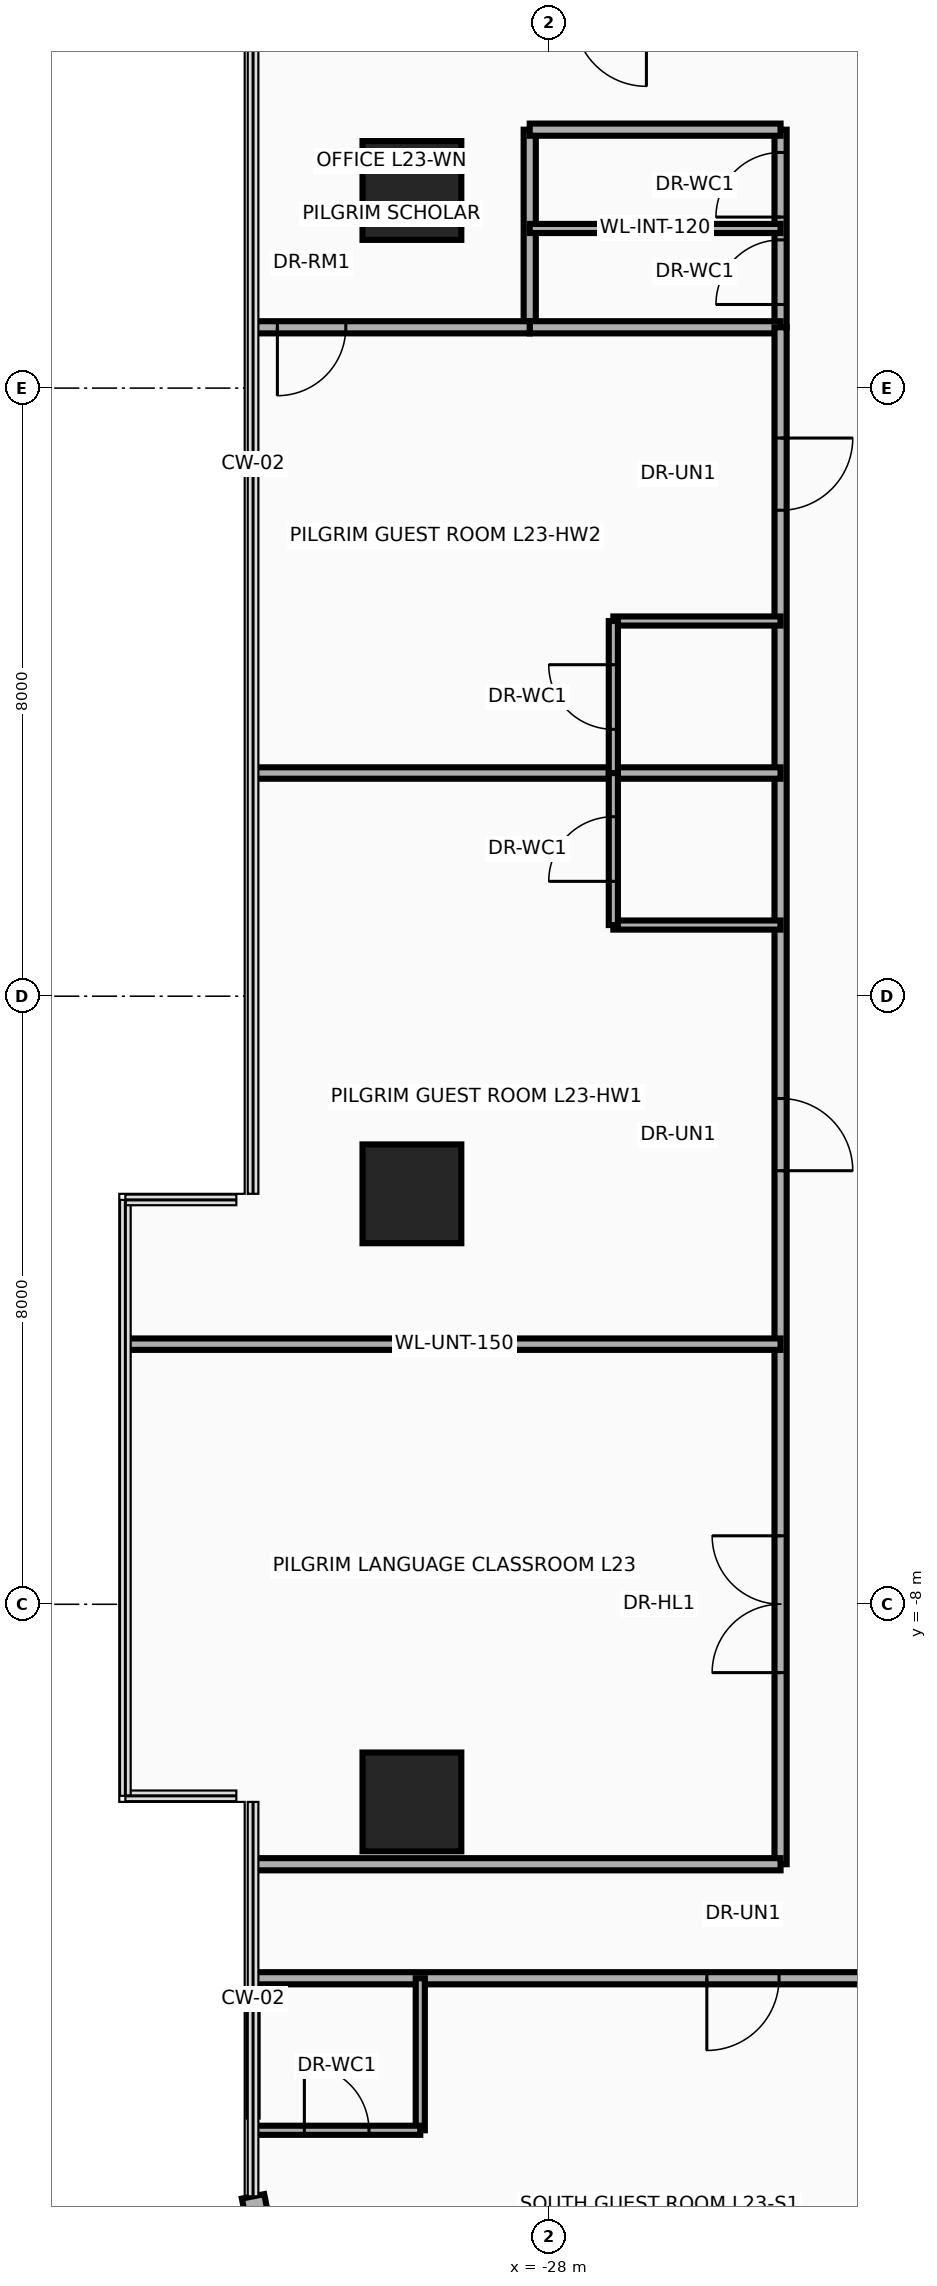
"""IFC4 building model, lengths in metres.
Left out: names, types, materials, properties, quantities, classifications, styles, units other than length and angle.
Written with IfcOpenShell. Run it as: python <this file> out.ifc"""

import sys

from ifc_helpers import new_model, si_unit, direction, frame, frame_2d, origin, origin_2d, place, context, subcontext, project, spatial, rectangle, circle, extrude, source, transform, mapped, element, fill, save


model = new_model("IFC4")
c1 = context("Model", 3, precision=1e-05, world=origin(), true_north=direction((0.0, 1.0)))
c2 = subcontext(c1, "Body", "Model", "MODEL_VIEW")
j1 = project(units=[si_unit("LENGTHUNIT", "METRE"), si_unit("PLANEANGLEUNIT", "RADIAN")], contexts=[c1])
p1 = place(None, origin())
s1 = spatial("IfcSite", under=j1, at=p1, CompositionType="ELEMENT")
p2 = place(p1, origin())
s2 = spatial("IfcBuilding", under=s1, at=p2, CompositionType="ELEMENT")
p3 = place(p2, frame((0.0, 0.0, 92.6)))
s3 = spatial("IfcBuildingStorey", under=s2, at=p3, CompositionType="ELEMENT", Elevation=92.6)
m1 = source(origin(), c2, "Body", "SweptSolid", [
    extrude(circle(Radius=0.65, at=origin_2d()), origin(), (0.0, 0.0, 1.0), 3.7),
])
for number, where, z_axis, x_axis in (
    (1, (-29.8, -10.6, 0.0), (0.0, 0.0, 1.0), (1.0, 0.0, 0.0)),
    (2, (-29.8, -2.6, 0.0), (0.0, 0.0, 1.0), (1.0, 0.0, 0.0)),
    (3, (-29.8, 10.6, 0.0), (0.0, 0.0, 1.0), (1.0, 0.0, 0.0)),
):
    element("IfcColumn", number, at=place(p3, frame(where, z_axis=z_axis, x_axis=x_axis)), inside=s3, PredefinedType="COLUMN", context=c2, shape_type="MappedRepresentation", body=[
        mapped(m1, transform((0.0, 0.0, 0.0), x_axis=(1.0, 0.0, 0.0), y_axis=(0.0, 1.0, 0.0), z_axis=(0.0, 0.0, 1.0), scale=1.0)),
    ])
p4 = place(p3, frame((-31.653, -16.982, 0.0), z_axis=(0.0, 0.0, 1.0), x_axis=(-0.194996050505, 0.980804027463, 0.0)))
e4 = element("IfcWall", 4, at=p4, inside=s3, PredefinedType="SOLIDWALL", context=c2, shape_type="SweptSolid", body=[
    extrude(rectangle(XDim=1.216, YDim=0.3, at=frame_2d((0.608, 0.0))), origin(), (0.0, 0.0, 1.0), 3.46),
])
p5 = place(p3, frame((-28.25, 8.8, 0.0), z_axis=(0.0, 0.0, 1.0), x_axis=(0.0, 1.0, 0.0)))
e5 = element("IfcWall", 5, at=p5, inside=s3, PredefinedType="PARTITIONING", context=c2, shape_type="SweptSolid", body=[
    extrude(rectangle(XDim=2.6, YDim=0.16, at=frame_2d((1.3, 0.0))), origin(), (0.0, 0.0, 1.0), 2.583),
])
p6 = place(p3, frame((-24.95, 8.8, 0.0), z_axis=(0.0, 0.0, 1.0), x_axis=(0.0, 1.0, 0.0)))
e6 = element("IfcWall", 6, at=p6, inside=s3, PredefinedType="PARTITIONING", context=c2, shape_type="SweptSolid", body=[
    extrude(rectangle(XDim=2.6, YDim=0.16, at=frame_2d((1.3, 0.0))), origin(), (0.0, 0.0, 1.0), 2.583),
])
p7 = place(p6, frame((0.3, 0.0, 0.0)))
e7 = element("IfcOpeningElement", 7, at=p7, cuts=e6, PredefinedType="OPENING", context=c2, shape_type="SweptSolid", body=[
    extrude(rectangle(XDim=0.85, YDim=2.1, at=frame_2d((0.425, 1.05))), frame((0.0, 0.095, 0.0), z_axis=(0.0, -1.0, 0.0), x_axis=(1.0, 0.0, 0.0)), (0.0, 0.0, 1.0), 0.19),
])
p8 = place(p6, frame((1.45, 0.0, 0.0)))
e8 = element("IfcOpeningElement", 8, at=p8, cuts=e6, PredefinedType="OPENING", context=c2, shape_type="SweptSolid", body=[
    extrude(rectangle(XDim=0.85, YDim=2.1, at=frame_2d((0.425, 1.05))), frame((0.0, 0.095, 0.0), z_axis=(0.0, -1.0, 0.0), x_axis=(1.0, 0.0, 0.0)), (0.0, 0.0, 1.0), 0.19),
])
for number, where, z_axis, x_axis in (
    (9, (-28.25, 8.8, 0.0), (0.0, 0.0, 1.0), (1.0, 0.0, 0.0)),
    (10, (-28.25, 11.4, 0.0), (0.0, 0.0, 1.0), (1.0, 0.0, 0.0)),
):
    element("IfcWall", number, at=place(p3, frame(where, z_axis=z_axis, x_axis=x_axis)), inside=s3, PredefinedType="PARTITIONING", context=c2, shape_type="SweptSolid", body=[
        extrude(rectangle(XDim=3.3, YDim=0.16, at=frame_2d((1.65, 0.0))), origin(), (0.0, 0.0, 1.0), 3.46),
    ])
p9 = place(p3, frame((-28.25, 10.1, 0.0), z_axis=(0.0, 0.0, 1.0), x_axis=(1.0, 0.0, 0.0)))
e11 = element("IfcWall", 11, at=p9, inside=s3, PredefinedType="PARTITIONING", context=c2, shape_type="SweptSolid", body=[
    extrude(rectangle(XDim=3.3, YDim=0.12, at=frame_2d((1.65, 0.0))), origin(), (0.0, 0.0, 1.0), 3.46),
])
p10 = place(p3, frame((-24.95, -11.42, 0.0), z_axis=(0.0, 0.0, 1.0), x_axis=(0.0, 1.0, 0.0)))
e12 = element("IfcWall", 12, at=p10, inside=s3, PredefinedType="PARTITIONING", context=c2, shape_type="SweptSolid", body=[
    extrude(rectangle(XDim=20.22, YDim=0.16, at=frame_2d((10.11, 0.0))), origin(), (0.0, 0.0, 1.0), 2.583),
])
p11 = place(p10, frame((2.521, 0.0, 0.0)))
e13 = element("IfcOpeningElement", 13, at=p11, cuts=e12, PredefinedType="OPENING", context=c2, shape_type="SweptSolid", body=[
    extrude(rectangle(XDim=1.8, YDim=2.15, at=frame_2d((0.9, 1.075))), frame((0.0, 0.095, 0.0), z_axis=(0.0, -1.0, 0.0), x_axis=(1.0, 0.0, 0.0)), (0.0, 0.0, 1.0), 0.19),
])
p12 = place(p10, frame((9.124, 0.0, 0.0)))
e14 = element("IfcOpeningElement", 14, at=p12, cuts=e12, PredefinedType="OPENING", context=c2, shape_type="SweptSolid", body=[
    extrude(rectangle(XDim=0.95, YDim=2.15, at=frame_2d((0.475, 1.075))), frame((0.0, 0.095, 0.0), z_axis=(0.0, -1.0, 0.0), x_axis=(1.0, 0.0, 0.0)), (0.0, 0.0, 1.0), 0.19),
])
p13 = place(p10, frame((17.813, 0.0, 0.0)))
e15 = element("IfcOpeningElement", 15, at=p13, cuts=e12, PredefinedType="OPENING", context=c2, shape_type="SweptSolid", body=[
    extrude(rectangle(XDim=0.95, YDim=2.15, at=frame_2d((0.475, 1.075))), frame((0.0, 0.095, 0.0), z_axis=(0.0, -1.0, 0.0), x_axis=(1.0, 0.0, 0.0)), (0.0, 0.0, 1.0), 0.19),
])
p14 = place(p3, frame((-31.89, 8.8, 0.0), z_axis=(0.0, 0.0, 1.0), x_axis=(1.0, 0.0, 0.0)))
e16 = element("IfcWall", 16, at=p14, inside=s3, PredefinedType="PARTITIONING", context=c2, shape_type="SweptSolid", body=[
    extrude(rectangle(XDim=3.64, YDim=0.16, at=frame_2d((1.82, 0.0))), origin(), (0.0, 0.0, 1.0), 2.896),
])
p15 = place(p14, frame((0.32, 0.0, 0.0)))
e17 = element("IfcOpeningElement", 17, at=p15, cuts=e16, PredefinedType="OPENING", context=c2, shape_type="SweptSolid", body=[
    extrude(rectangle(XDim=0.9, YDim=2.1, at=frame_2d((0.45, 1.05))), frame((0.0, 0.095, 0.0), z_axis=(0.0, -1.0, 0.0), x_axis=(1.0, 0.0, 0.0)), (0.0, 0.0, 1.0), 0.19),
])
p16 = place(p3, frame((-33.54, -4.578, 0.0), z_axis=(0.0, 0.0, 1.0), x_axis=(1.0, 0.0, 0.0)))
e18 = element("IfcWall", 18, at=p16, inside=s3, PredefinedType="PARTITIONING", context=c2, shape_type="SweptSolid", body=[
    extrude(rectangle(XDim=8.59, YDim=0.15, at=frame_2d((4.295, 0.0))), origin(), (0.0, 0.0, 1.0), 2.896),
])
p17 = place(p3, frame((-31.89, 2.936, 0.0), z_axis=(0.0, 0.0, 1.0), x_axis=(1.0, 0.0, 0.0)))
e19 = element("IfcWall", 19, at=p17, inside=s3, PredefinedType="PARTITIONING", context=c2, shape_type="SweptSolid", body=[
    extrude(rectangle(XDim=6.94, YDim=0.15, at=frame_2d((3.47, 0.0))), origin(), (0.0, 0.0, 1.0), 2.896),
])
p18 = place(p3, frame((-27.15, 0.936, 0.0), z_axis=(0.0, 0.0, 1.0), x_axis=(1.0, 0.0, 0.0)))
e20 = element("IfcWall", 20, at=p18, inside=s3, PredefinedType="PARTITIONING", context=c2, shape_type="SweptSolid", body=[
    extrude(rectangle(XDim=2.2, YDim=0.12, at=frame_2d((1.1, 0.0))), origin(), (0.0, 0.0, 1.0), 2.979),
])
p19 = place(p3, frame((-27.15, 0.936, 0.0), z_axis=(0.0, 0.0, 1.0), x_axis=(0.0, 1.0, 0.0)))
e21 = element("IfcWall", 21, at=p19, inside=s3, PredefinedType="PARTITIONING", context=c2, shape_type="SweptSolid", body=[
    extrude(rectangle(XDim=2.0, YDim=0.12, at=frame_2d((1.0, 0.0))), origin(), (0.0, 0.0, 1.0), 2.979),
])
p20 = place(p19, frame((0.575, 0.0, 0.0)))
e22 = element("IfcOpeningElement", 22, at=p20, cuts=e21, PredefinedType="OPENING", context=c2, shape_type="SweptSolid", body=[
    extrude(rectangle(XDim=0.85, YDim=2.1, at=frame_2d((0.425, 1.05))), frame((0.0, 0.075, 0.0), z_axis=(0.0, -1.0, 0.0), x_axis=(1.0, 0.0, 0.0)), (0.0, 0.0, 1.0), 0.15),
])
p21 = place(p3, frame((-27.15, 4.936, 0.0), z_axis=(0.0, 0.0, 1.0), x_axis=(1.0, 0.0, 0.0)))
e23 = element("IfcWall", 23, at=p21, inside=s3, PredefinedType="PARTITIONING", context=c2, shape_type="SweptSolid", body=[
    extrude(rectangle(XDim=2.2, YDim=0.12, at=frame_2d((1.1, 0.0))), origin(), (0.0, 0.0, 1.0), 3.46),
])
p22 = place(p3, frame((-27.15, 2.936, 0.0), z_axis=(0.0, 0.0, 1.0), x_axis=(0.0, 1.0, 0.0)))
e24 = element("IfcWall", 24, at=p22, inside=s3, PredefinedType="PARTITIONING", context=c2, shape_type="SweptSolid", body=[
    extrude(rectangle(XDim=2.0, YDim=0.12, at=frame_2d((1.0, 0.0))), origin(), (0.0, 0.0, 1.0), 2.979),
])
p23 = place(p22, frame((0.575, 0.0, 0.0)))
e25 = element("IfcOpeningElement", 25, at=p23, cuts=e24, PredefinedType="OPENING", context=c2, shape_type="SweptSolid", body=[
    extrude(rectangle(XDim=0.85, YDim=2.1, at=frame_2d((0.425, 1.05))), frame((0.0, 0.075, 0.0), z_axis=(0.0, -1.0, 0.0), x_axis=(1.0, 0.0, 0.0)), (0.0, 0.0, 1.0), 0.15),
])
p24 = place(p3, frame((-31.89, -12.92, 0.0), z_axis=(0.0, 0.0, 1.0), x_axis=(1.0, 0.0, 0.0)))
e26 = element("IfcWall", 26, at=p24, inside=s3, PredefinedType="PARTITIONING", context=c2, shape_type="SweptSolid", body=[
    extrude(rectangle(XDim=22.28, YDim=0.16, at=frame_2d((11.14, 0.0))), origin(), (0.0, 0.0, 1.0), 2.834),
])
p25 = place(p24, frame((5.97, 0.0, 0.0)))
e27 = element("IfcOpeningElement", 27, at=p25, cuts=e26, PredefinedType="OPENING", context=c2, shape_type="SweptSolid", body=[
    extrude(rectangle(XDim=0.95, YDim=2.15, at=frame_2d((0.475, 1.075))), frame((0.0, 0.095, 0.0), z_axis=(0.0, -1.0, 0.0), x_axis=(1.0, 0.0, 0.0)), (0.0, 0.0, 1.0), 0.19),
])
p26 = place(p24, frame((16.01, 0.0, 0.0)))
e28 = element("IfcOpeningElement", 28, at=p26, cuts=e26, PredefinedType="OPENING", context=c2, shape_type="SweptSolid", body=[
    extrude(rectangle(XDim=0.95, YDim=2.15, at=frame_2d((0.475, 1.075))), frame((0.0, 0.095, 0.0), z_axis=(0.0, -1.0, 0.0), x_axis=(1.0, 0.0, 0.0)), (0.0, 0.0, 1.0), 0.19),
])
p27 = place(p3, frame((-29.69, -14.92, 0.0), z_axis=(0.0, 0.0, 1.0), x_axis=(0.0, 1.0, 0.0)))
e29 = element("IfcWall", 29, at=p27, inside=s3, PredefinedType="PARTITIONING", context=c2, shape_type="SweptSolid", body=[
    extrude(rectangle(XDim=2.0, YDim=0.12, at=frame_2d((1.0, 0.0))), origin(), (0.0, 0.0, 1.0), 3.46),
])
p28 = place(p3, frame((-31.89, -14.92, 0.0), z_axis=(0.0, 0.0, 1.0), x_axis=(1.0, 0.0, 0.0)))
e30 = element("IfcWall", 30, at=p28, inside=s3, PredefinedType="PARTITIONING", context=c2, shape_type="SweptSolid", body=[
    extrude(rectangle(XDim=2.2, YDim=0.12, at=frame_2d((1.1, 0.0))), origin(), (0.0, 0.0, 1.0), 3.46),
])
p29 = place(p28, frame((0.675, 0.0, 0.0)))
e31 = element("IfcOpeningElement", 31, at=p29, cuts=e30, PredefinedType="OPENING", context=c2, shape_type="SweptSolid", body=[
    extrude(rectangle(XDim=0.85, YDim=2.1, at=frame_2d((0.425, 1.05))), frame((0.0, 0.075, 0.0), z_axis=(0.0, -1.0, 0.0), x_axis=(1.0, 0.0, 0.0)), (0.0, 0.0, 1.0), 0.15),
])
p30 = place(p3, frame((-31.89, -14.74, 0.0), z_axis=(0.0, 0.0, 1.0), x_axis=(0.0, 1.0, 0.0)))
e32 = element("IfcWall", 32, at=p30, inside=s3, PredefinedType="PARTITIONING", context=c2, shape_type="SweptSolid", body=[
    extrude(rectangle(XDim=1.62, YDim=0.12, at=frame_2d((0.81, 0.0))), origin(), (0.0, 0.0, 1.0), 3.46),
])
p31 = place(p3, frame((-31.89, -11.42, 0.0), z_axis=(0.0, 0.0, 1.0), x_axis=(1.0, 0.0, 0.0)))
e33 = element("IfcWall", 33, at=p31, inside=s3, PredefinedType="PARTITIONING", context=c2, shape_type="SweptSolid", body=[
    extrude(rectangle(XDim=6.94, YDim=0.16, at=frame_2d((3.47, 0.0))), origin(), (0.0, 0.0, 1.0), 3.46),
])
p32 = place(p7, origin())
e34 = element("IfcDoor", 34, at=p32, inside=s3, OperationType="SINGLE_SWING_LEFT", PredefinedType="DOOR", context=c2, shape_type="SweptSolid", body=[
    extrude(rectangle(XDim=0.85, YDim=2.1, at=frame_2d((0.425, 1.05))), frame((0.0, 0.025, 0.0), z_axis=(0.0, -1.0, 0.0), x_axis=(1.0, 0.0, 0.0)), (0.0, 0.0, 1.0), 0.05),
])
fill(e7, e34)
p33 = place(p8, origin())
e35 = element("IfcDoor", 35, at=p33, inside=s3, OperationType="SINGLE_SWING_RIGHT", PredefinedType="DOOR", context=c2, shape_type="SweptSolid", body=[
    extrude(rectangle(XDim=0.85, YDim=2.1, at=frame_2d((0.425, 1.05))), frame((0.0, 0.025, 0.0), z_axis=(0.0, -1.0, 0.0), x_axis=(1.0, 0.0, 0.0)), (0.0, 0.0, 1.0), 0.05),
])
fill(e8, e35)
p34 = place(p15, frame((0.9, 0.0, 0.0), z_axis=(0.0, 0.0, 1.0), x_axis=(-1.0, 0.0, 0.0)))
e36 = element("IfcDoor", 36, at=p34, inside=s3, OperationType="SINGLE_SWING_LEFT", PredefinedType="DOOR", context=c2, shape_type="SweptSolid", body=[
    extrude(rectangle(XDim=0.9, YDim=2.1, at=frame_2d((0.45, 1.05))), frame((0.0, 0.025, 0.0), z_axis=(0.0, -1.0, 0.0), x_axis=(1.0, 0.0, 0.0)), (0.0, 0.0, 1.0), 0.05),
])
fill(e17, e36)
p35 = place(p11, origin())
e37 = element("IfcDoor", 37, at=p35, inside=s3, OperationType="DOUBLE_DOOR_SINGLE_SWING", PredefinedType="DOOR", context=c2, shape_type="SweptSolid", body=[
    extrude(rectangle(XDim=1.8, YDim=2.15, at=frame_2d((0.9, 1.075))), frame((0.0, 0.025, 0.0), z_axis=(0.0, -1.0, 0.0), x_axis=(1.0, 0.0, 0.0)), (0.0, 0.0, 1.0), 0.05),
])
fill(e13, e37)
p36 = place(p12, frame((0.95, 0.0, 0.0), z_axis=(0.0, 0.0, 1.0), x_axis=(-1.0, 0.0, 0.0)))
e38 = element("IfcDoor", 38, at=p36, inside=s3, OperationType="SINGLE_SWING_LEFT", PredefinedType="DOOR", context=c2, shape_type="SweptSolid", body=[
    extrude(rectangle(XDim=0.95, YDim=2.15, at=frame_2d((0.475, 1.075))), frame((0.0, 0.025, 0.0), z_axis=(0.0, -1.0, 0.0), x_axis=(1.0, 0.0, 0.0)), (0.0, 0.0, 1.0), 0.05),
])
fill(e14, e38)
p37 = place(p20, origin())
e39 = element("IfcDoor", 39, at=p37, inside=s3, OperationType="SINGLE_SWING_RIGHT", PredefinedType="DOOR", context=c2, shape_type="SweptSolid", body=[
    extrude(rectangle(XDim=0.85, YDim=2.1, at=frame_2d((0.425, 1.05))), frame((0.0, 0.025, 0.0), z_axis=(0.0, -1.0, 0.0), x_axis=(1.0, 0.0, 0.0)), (0.0, 0.0, 1.0), 0.05),
])
fill(e22, e39)
p38 = place(p13, frame((0.95, 0.0, 0.0), z_axis=(0.0, 0.0, 1.0), x_axis=(-1.0, 0.0, 0.0)))
e40 = element("IfcDoor", 40, at=p38, inside=s3, OperationType="SINGLE_SWING_LEFT", PredefinedType="DOOR", context=c2, shape_type="SweptSolid", body=[
    extrude(rectangle(XDim=0.95, YDim=2.15, at=frame_2d((0.475, 1.075))), frame((0.0, 0.025, 0.0), z_axis=(0.0, -1.0, 0.0), x_axis=(1.0, 0.0, 0.0)), (0.0, 0.0, 1.0), 0.05),
])
fill(e15, e40)
p39 = place(p23, origin())
e41 = element("IfcDoor", 41, at=p39, inside=s3, OperationType="SINGLE_SWING_RIGHT", PredefinedType="DOOR", context=c2, shape_type="SweptSolid", body=[
    extrude(rectangle(XDim=0.85, YDim=2.1, at=frame_2d((0.425, 1.05))), frame((0.0, 0.025, 0.0), z_axis=(0.0, -1.0, 0.0), x_axis=(1.0, 0.0, 0.0)), (0.0, 0.0, 1.0), 0.05),
])
fill(e25, e41)
p40 = place(p25, frame((0.95, 0.0, 0.0), z_axis=(0.0, 0.0, 1.0), x_axis=(-1.0, 0.0, 0.0)))
e42 = element("IfcDoor", 42, at=p40, inside=s3, OperationType="SINGLE_SWING_LEFT", PredefinedType="DOOR", context=c2, shape_type="SweptSolid", body=[
    extrude(rectangle(XDim=0.95, YDim=2.15, at=frame_2d((0.475, 1.075))), frame((0.0, 0.025, 0.0), z_axis=(0.0, -1.0, 0.0), x_axis=(1.0, 0.0, 0.0)), (0.0, 0.0, 1.0), 0.05),
])
fill(e27, e42)
p41 = place(p29, origin())
e43 = element("IfcDoor", 43, at=p41, inside=s3, OperationType="SINGLE_SWING_RIGHT", PredefinedType="DOOR", context=c2, shape_type="SweptSolid", body=[
    extrude(rectangle(XDim=0.85, YDim=2.1, at=frame_2d((0.425, 1.05))), frame((0.0, 0.025, 0.0), z_axis=(0.0, -1.0, 0.0), x_axis=(1.0, 0.0, 0.0)), (0.0, 0.0, 1.0), 0.05),
])
fill(e31, e43)
save(model, sys.argv[1])
